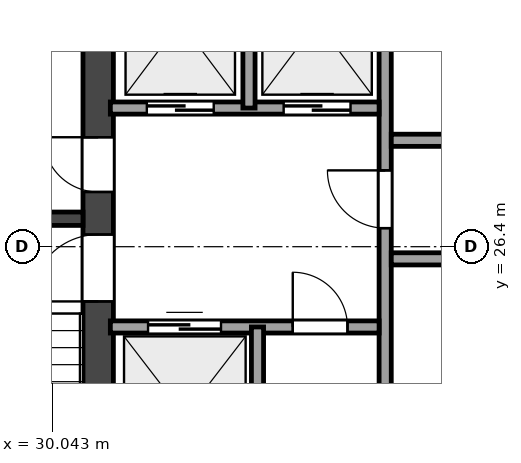
"""IFC4 building model, lengths in metres.
Left out: names, types, materials, properties, quantities, classifications, styles, units other than length and angle.
Written with IfcOpenShell. Run it as: python <this file> out.ifc"""

import sys

from ifc_helpers import new_model, si_unit, direction, frame, frame_2d, origin, place, context, subcontext, project, spatial, rectangle, extrude, element, fill, save


model = new_model("IFC4")
c1 = context("Model", 3, precision=1e-05, world=origin(), true_north=direction((0.0, 1.0)))
c2 = subcontext(c1, "Body", "Model", "MODEL_VIEW")
j1 = project(units=[si_unit("LENGTHUNIT", "METRE"), si_unit("PLANEANGLEUNIT", "RADIAN")], contexts=[c1])
p1 = place(None, origin())
s1 = spatial("IfcSite", under=j1, at=p1, CompositionType="ELEMENT")
p2 = place(p1, origin())
s2 = spatial("IfcBuilding", under=s1, at=p2, CompositionType="ELEMENT")
p3 = place(p2, frame((0.0, 0.0, 54.6)))
s3 = spatial("IfcBuildingStorey", under=s2, at=p3, CompositionType="ELEMENT", Elevation=54.6)
p4 = place(p3, frame((30.8, 18.925, 0.0), z_axis=(0.0, 0.0, 1.0), x_axis=(0.0, 1.0, 0.0)))
e1 = element("IfcWall", 1, at=p4, inside=s3, PredefinedType="SHEAR", context=c2, shape_type="SweptSolid", body=[
    extrude(rectangle(XDim=14.95, YDim=0.5, at=frame_2d((7.475, 0.0))), origin(), (0.0, 0.0, 1.0), 3.17),
])
p5 = place(p4, frame((6.575, 0.0, 0.0)))
e2 = element("IfcOpeningElement", 2, at=p5, cuts=e1, PredefinedType="OPENING", context=c2, shape_type="SweptSolid", body=[
    extrude(rectangle(XDim=1.1, YDim=2.15, at=frame_2d((0.55, 1.075))), frame((0.0, 0.26, 0.0), z_axis=(0.0, -1.0, 0.0), x_axis=(1.0, 0.0, 0.0)), (0.0, 0.0, 1.0), 0.52),
])
p6 = place(p4, frame((8.375, 0.0, 0.0)))
e3 = element("IfcOpeningElement", 3, at=p6, cuts=e1, PredefinedType="OPENING", context=c2, shape_type="SweptSolid", body=[
    extrude(rectangle(XDim=0.9, YDim=2.1, at=frame_2d((0.45, 1.05))), frame((0.0, 0.26, 0.0), z_axis=(0.0, -1.0, 0.0), x_axis=(1.0, 0.0, 0.0)), (0.0, 0.0, 1.0), 0.52),
])
p7 = place(p3, frame((27.125, 26.86, 0.0), z_axis=(0.0, 0.0, 1.0), x_axis=(1.0, 0.0, 0.0)))
e4 = element("IfcWall", 4, at=p7, inside=s3, PredefinedType="SHEAR", context=c2, shape_type="SweptSolid", body=[
    extrude(rectangle(XDim=3.425, YDim=0.22, at=frame_2d((1.712, 0.0))), origin(), (0.0, 0.0, 1.0), 3.17),
])
p8 = place(p3, frame((35.52, 18.95, 0.0), z_axis=(0.0, 0.0, 1.0), x_axis=(0.0, 1.0, 0.0)))
e5 = element("IfcWall", 5, at=p8, inside=s3, PredefinedType="SOLIDWALL", context=c2, shape_type="SweptSolid", body=[
    extrude(rectangle(XDim=14.9, YDim=0.2, at=frame_2d((7.45, 0.0))), origin(), (0.0, 0.0, 1.0), 2.691),
])
p9 = place(p8, frame((7.755, 0.0, 0.0)))
e6 = element("IfcOpeningElement", 6, at=p9, cuts=e5, PredefinedType="OPENING", context=c2, shape_type="SweptSolid", body=[
    extrude(rectangle(XDim=0.95, YDim=2.15, at=frame_2d((0.475, 1.075))), frame((0.0, 0.11, 0.0), z_axis=(0.0, -1.0, 0.0), x_axis=(1.0, 0.0, 0.0)), (0.0, 0.0, 1.0), 0.22),
])
p10 = place(p8, frame((0.6, 0.0, 0.0)))
e7 = element("IfcOpeningElement", 7, at=p10, cuts=e5, PredefinedType="OPENING", context=c2, shape_type="SweptSolid", body=[
    extrude(rectangle(XDim=0.9, YDim=2.1, at=frame_2d((0.45, 1.05))), frame((0.0, 0.11, 0.0), z_axis=(0.0, -1.0, 0.0), x_axis=(1.0, 0.0, 0.0)), (0.0, 0.0, 1.0), 0.22),
])
p11 = place(p3, frame((31.0, 28.68, 0.0), z_axis=(0.0, 0.0, 1.0), x_axis=(1.0, 0.0, 0.0)))
e8 = element("IfcWall", 8, at=p11, inside=s3, PredefinedType="SOLIDWALL", context=c2, shape_type="SweptSolid", body=[
    extrude(rectangle(XDim=4.42, YDim=0.2, at=frame_2d((2.21, 0.0))), origin(), (0.0, 0.0, 1.0), 3.17),
])
p12 = place(p11, frame((0.6, 0.0, 0.0)))
e9 = element("IfcOpeningElement", 9, at=p12, cuts=e8, PredefinedType="OPENING", context=c2, shape_type="SweptSolid", body=[
    extrude(rectangle(XDim=1.1, YDim=2.15, at=frame_2d((0.55, 1.075))), frame((0.0, 0.11, 0.0), z_axis=(0.0, -1.0, 0.0), x_axis=(1.0, 0.0, 0.0)), (0.0, 0.0, 1.0), 0.22),
])
p13 = place(p11, frame((2.85, 0.0, 0.0)))
e10 = element("IfcOpeningElement", 10, at=p13, cuts=e8, PredefinedType="OPENING", context=c2, shape_type="SweptSolid", body=[
    extrude(rectangle(XDim=1.1, YDim=2.15, at=frame_2d((0.55, 1.075))), frame((0.0, 0.11, 0.0), z_axis=(0.0, -1.0, 0.0), x_axis=(1.0, 0.0, 0.0)), (0.0, 0.0, 1.0), 0.22),
])
p14 = place(p3, frame((33.28, 28.68, 0.0), z_axis=(0.0, 0.0, 1.0), x_axis=(0.0, 1.0, 0.0)))
e11 = element("IfcWall", 11, at=p14, inside=s3, PredefinedType="SOLIDWALL", context=c2, shape_type="SweptSolid", body=[
    extrude(rectangle(XDim=2.82, YDim=0.2, at=frame_2d((1.41, 0.0))), origin(), (0.0, 0.0, 1.0), 3.17),
])
p15 = place(p3, frame((31.0, 25.08, 0.0), z_axis=(0.0, 0.0, 1.0), x_axis=(1.0, 0.0, 0.0)))
e12 = element("IfcWall", 12, at=p15, inside=s3, PredefinedType="SOLIDWALL", context=c2, shape_type="SweptSolid", body=[
    extrude(rectangle(XDim=4.42, YDim=0.2, at=frame_2d((2.21, 0.0))), origin(), (0.0, 0.0, 1.0), 3.17),
])
p16 = place(p15, frame((3.0, 0.0, 0.0)))
e13 = element("IfcOpeningElement", 13, at=p16, cuts=e12, PredefinedType="OPENING", context=c2, shape_type="SweptSolid", body=[
    extrude(rectangle(XDim=0.9, YDim=2.1, at=frame_2d((0.45, 1.05))), frame((0.0, 0.11, 0.0), z_axis=(0.0, -1.0, 0.0), x_axis=(1.0, 0.0, 0.0)), (0.0, 0.0, 1.0), 0.22),
])
p17 = place(p15, frame((0.62, 0.0, 0.0)))
e14 = element("IfcOpeningElement", 14, at=p17, cuts=e12, PredefinedType="OPENING", context=c2, shape_type="SweptSolid", body=[
    extrude(rectangle(XDim=1.2, YDim=2.15, at=frame_2d((0.6, 1.075))), frame((0.0, 0.11, 0.0), z_axis=(0.0, -1.0, 0.0), x_axis=(1.0, 0.0, 0.0)), (0.0, 0.0, 1.0), 0.22),
])
p18 = place(p3, frame((33.42, 18.95, 0.0), z_axis=(0.0, 0.0, 1.0), x_axis=(0.0, 1.0, 0.0)))
e15 = element("IfcWall", 15, at=p18, inside=s3, PredefinedType="SOLIDWALL", context=c2, shape_type="SweptSolid", body=[
    extrude(rectangle(XDim=6.13, YDim=0.2, at=frame_2d((3.065, 0.0))), origin(), (0.0, 0.0, 1.0), 2.691),
])
for number, where, z_axis, x_axis in (
    (16, (35.62, 28.15, 0.0), (0.0, 0.0, 1.0), (1.0, 0.0, 0.0)),
    (17, (35.62, 26.2, 0.0), (0.0, 0.0, 1.0), (1.0, 0.0, 0.0)),
):
    element("IfcWall", number, at=place(p3, frame(where, z_axis=z_axis, x_axis=x_axis)), inside=s3, PredefinedType="SOLIDWALL", context=c2, shape_type="SweptSolid", body=[
        extrude(rectangle(XDim=7.88, YDim=0.2, at=frame_2d((3.94, 0.0))), origin(), (0.0, 0.0, 1.0), 3.17),
    ])
p19 = place(p5, origin())
e18 = element("IfcDoor", 18, at=p19, inside=s3, OperationType="SINGLE_SWING_LEFT", PredefinedType="DOOR", context=c2, shape_type="SweptSolid", body=[
    extrude(rectangle(XDim=1.1, YDim=2.15, at=frame_2d((0.55, 1.075))), frame((0.0, 0.025, 0.0), z_axis=(0.0, -1.0, 0.0), x_axis=(1.0, 0.0, 0.0)), (0.0, 0.0, 1.0), 0.05),
])
fill(e2, e18)
p20 = place(p9, origin())
e19 = element("IfcDoor", 19, at=p20, inside=s3, OperationType="SINGLE_SWING_RIGHT", PredefinedType="DOOR", context=c2, shape_type="SweptSolid", body=[
    extrude(rectangle(XDim=0.95, YDim=2.15, at=frame_2d((0.475, 1.075))), frame((0.0, 0.025, 0.0), z_axis=(0.0, -1.0, 0.0), x_axis=(1.0, 0.0, 0.0)), (0.0, 0.0, 1.0), 0.05),
])
fill(e6, e19)
p21 = place(p6, origin())
e20 = element("IfcDoor", 20, at=p21, inside=s3, OperationType="SINGLE_SWING_RIGHT", PredefinedType="DOOR", context=c2, shape_type="SweptSolid", body=[
    extrude(rectangle(XDim=0.9, YDim=2.1, at=frame_2d((0.45, 1.05))), frame((0.0, 0.025, 0.0), z_axis=(0.0, -1.0, 0.0), x_axis=(1.0, 0.0, 0.0)), (0.0, 0.0, 1.0), 0.05),
])
fill(e3, e20)
p22 = place(p16, origin())
e21 = element("IfcDoor", 21, at=p22, inside=s3, OperationType="SINGLE_SWING_LEFT", PredefinedType="DOOR", context=c2, shape_type="SweptSolid", body=[
    extrude(rectangle(XDim=0.9, YDim=2.1, at=frame_2d((0.45, 1.05))), frame((0.0, 0.025, 0.0), z_axis=(0.0, -1.0, 0.0), x_axis=(1.0, 0.0, 0.0)), (0.0, 0.0, 1.0), 0.05),
])
fill(e13, e21)
p23 = place(p12, origin())
e22 = element("IfcDoor", 22, at=p23, inside=s3, OperationType="SLIDING_TO_LEFT", PredefinedType="DOOR", context=c2, shape_type="SweptSolid", body=[
    extrude(rectangle(XDim=1.1, YDim=2.15, at=frame_2d((0.55, 1.075))), frame((0.0, 0.025, 0.0), z_axis=(0.0, -1.0, 0.0), x_axis=(1.0, 0.0, 0.0)), (0.0, 0.0, 1.0), 0.05),
])
fill(e9, e22)
p24 = place(p13, origin())
e23 = element("IfcDoor", 23, at=p24, inside=s3, OperationType="SLIDING_TO_LEFT", PredefinedType="DOOR", context=c2, shape_type="SweptSolid", body=[
    extrude(rectangle(XDim=1.1, YDim=2.15, at=frame_2d((0.55, 1.075))), frame((0.0, 0.025, 0.0), z_axis=(0.0, -1.0, 0.0), x_axis=(1.0, 0.0, 0.0)), (0.0, 0.0, 1.0), 0.05),
])
fill(e10, e23)
p25 = place(p17, origin())
e24 = element("IfcDoor", 24, at=p25, inside=s3, OperationType="SLIDING_TO_LEFT", PredefinedType="DOOR", context=c2, shape_type="SweptSolid", body=[
    extrude(rectangle(XDim=1.2, YDim=2.15, at=frame_2d((0.6, 1.075))), frame((0.0, 0.025, 0.0), z_axis=(0.0, -1.0, 0.0), x_axis=(1.0, 0.0, 0.0)), (0.0, 0.0, 1.0), 0.05),
])
fill(e14, e24)
save(model, sys.argv[1])
